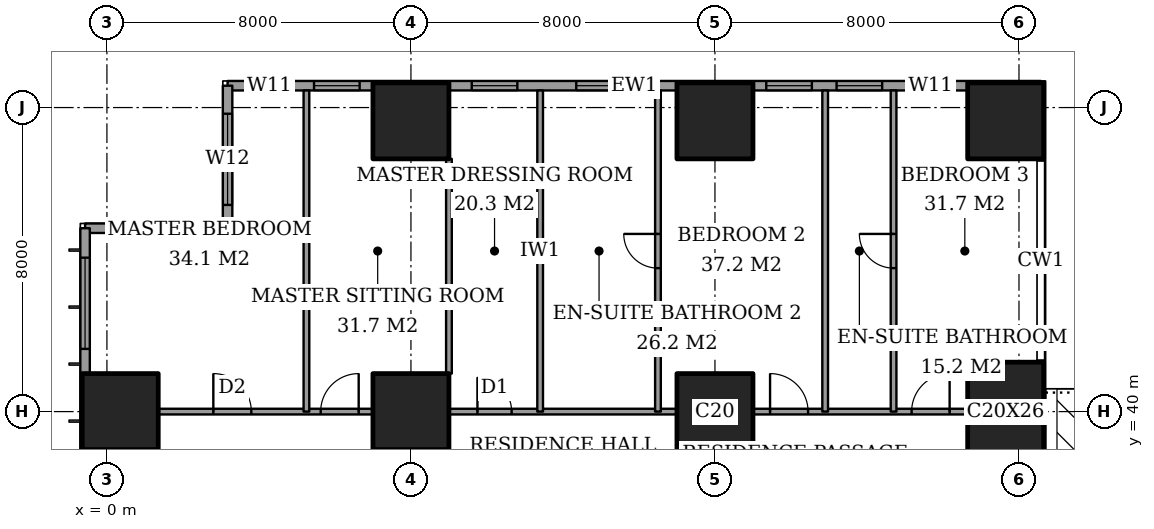
"""IFC4 building model, lengths in metres.
Left out: names, types, materials, properties, quantities, classifications, styles, units other than length and angle.
Written with IfcOpenShell. Run it as: python <this file> out.ifc"""

import sys

from ifc_helpers import new_model, si_unit, direction, frame, frame_2d, origin, origin_2d, place, context, subcontext, project, spatial, rectangle, extrude, element, fill, save


model = new_model("IFC4")
c1 = context("Model", 3, precision=1e-05, world=origin(), true_north=direction((0.0, 1.0)))
c2 = subcontext(c1, "Body", "Model", "MODEL_VIEW")
j1 = project(units=[si_unit("LENGTHUNIT", "METRE"), si_unit("PLANEANGLEUNIT", "RADIAN")], contexts=[c1])
p1 = place(None, origin())
s1 = spatial("IfcSite", under=j1, at=p1, CompositionType="ELEMENT")
p2 = place(p1, origin())
s2 = spatial("IfcBuilding", under=s1, at=p2, CompositionType="ELEMENT")
p3 = place(p2, frame((0.0, 0.0, 96.2)))
s3 = spatial("IfcBuildingStorey", under=s2, at=p3, CompositionType="ELEMENT", Elevation=96.2)
for number, where, z_axis, x_axis in (
    (1, (0.35, 40.0, 0.0), (0.0, 0.0, 1.0), (1.0, 0.0, 0.0)),
    (2, (8.0, 40.0, 0.0), (0.0, 0.0, 1.0), (1.0, 0.0, 0.0)),
    (3, (8.0, 47.65, 0.0), (0.0, 0.0, 1.0), (1.0, 0.0, 0.0)),
    (4, (16.0, 40.0, 0.0), (0.0, 0.0, 1.0), (1.0, 0.0, 0.0)),
    (5, (16.0, 47.65, 0.0), (0.0, 0.0, 1.0), (1.0, 0.0, 0.0)),
):
    element("IfcColumn", number, at=place(p3, frame(where, z_axis=z_axis, x_axis=x_axis)), inside=s3, PredefinedType="COLUMN", context=c2, shape_type="SweptSolid", body=[
        extrude(rectangle(XDim=2.0, YDim=2.0, at=origin_2d()), origin(), (0.0, 0.0, 1.0), 3.6),
    ])
p4 = place(p3, frame((23.65, 40.0, 0.0), z_axis=(0.0, 0.0, 1.0), x_axis=(1.0, 0.0, 0.0)))
e6 = element("IfcColumn", 6, at=p4, inside=s3, PredefinedType="COLUMN", context=c2, shape_type="SweptSolid", body=[
    extrude(rectangle(XDim=2.0, YDim=2.6, at=origin_2d()), origin(), (0.0, 0.0, 1.0), 3.6),
])
p5 = place(p3, frame((23.65, 47.65, 0.0), z_axis=(0.0, 0.0, 1.0), x_axis=(1.0, 0.0, 0.0)))
e7 = element("IfcColumn", 7, at=p5, inside=s3, PredefinedType="COLUMN", context=c2, shape_type="SweptSolid", body=[
    extrude(rectangle(XDim=2.0, YDim=2.0, at=origin_2d()), origin(), (0.0, 0.0, 1.0), 3.6),
])
p6 = place(p3, frame((24.575, 48.575, 0.0), z_axis=(0.0, 0.0, 1.0), x_axis=(-1.0, 0.0, 0.0)))
e8 = element("IfcWall", 8, at=p6, inside=s3, PredefinedType="SOLIDWALL", context=c2, shape_type="SweptSolid", body=[
    extrude(rectangle(XDim=21.4, YDim=0.25, at=frame_2d((10.7, 0.0))), origin(), (0.0, 0.0, 1.0), 3.6),
])
p7 = place(p6, frame((2.3, 0.0, 0.4)))
e9 = element("IfcOpeningElement", 9, at=p7, cuts=e8, PredefinedType="OPENING", context=c2, shape_type="SweptSolid", body=[
    extrude(rectangle(XDim=1.2, YDim=2.2, at=frame_2d((0.6, 1.1))), frame((0.0, 0.135, 0.0), z_axis=(0.0, -1.0, 0.0), x_axis=(1.0, 0.0, 0.0)), (0.0, 0.0, 1.0), 0.27),
])
p8 = place(p6, frame((4.175, 0.0, 0.4)))
e10 = element("IfcOpeningElement", 10, at=p8, cuts=e8, PredefinedType="OPENING", context=c2, shape_type="SweptSolid", body=[
    extrude(rectangle(XDim=1.2, YDim=2.2, at=frame_2d((0.6, 1.1))), frame((0.0, 0.135, 0.0), z_axis=(0.0, -1.0, 0.0), x_axis=(1.0, 0.0, 0.0)), (0.0, 0.0, 1.0), 0.27),
])
p9 = place(p6, frame((6.025, 0.0, 0.4)))
e11 = element("IfcOpeningElement", 11, at=p9, cuts=e8, PredefinedType="OPENING", context=c2, shape_type="SweptSolid", body=[
    extrude(rectangle(XDim=1.2, YDim=2.2, at=frame_2d((0.6, 1.1))), frame((0.0, 0.135, 0.0), z_axis=(0.0, -1.0, 0.0), x_axis=(1.0, 0.0, 0.0)), (0.0, 0.0, 1.0), 0.27),
])
p10 = place(p6, frame((11.025, 0.0, 0.4)))
e12 = element("IfcOpeningElement", 12, at=p10, cuts=e8, PredefinedType="OPENING", context=c2, shape_type="SweptSolid", body=[
    extrude(rectangle(XDim=1.2, YDim=2.2, at=frame_2d((0.6, 1.1))), frame((0.0, 0.135, 0.0), z_axis=(0.0, -1.0, 0.0), x_axis=(1.0, 0.0, 0.0)), (0.0, 0.0, 1.0), 0.27),
])
p11 = place(p6, frame((13.775, 0.0, 0.4)))
e13 = element("IfcOpeningElement", 13, at=p11, cuts=e8, PredefinedType="OPENING", context=c2, shape_type="SweptSolid", body=[
    extrude(rectangle(XDim=1.2, YDim=2.2, at=frame_2d((0.6, 1.1))), frame((0.0, 0.135, 0.0), z_axis=(0.0, -1.0, 0.0), x_axis=(1.0, 0.0, 0.0)), (0.0, 0.0, 1.0), 0.27),
])
p12 = place(p6, frame((17.925, 0.0, 0.4)))
e14 = element("IfcOpeningElement", 14, at=p12, cuts=e8, PredefinedType="OPENING", context=c2, shape_type="SweptSolid", body=[
    extrude(rectangle(XDim=1.2, YDim=2.2, at=frame_2d((0.6, 1.1))), frame((0.0, 0.135, 0.0), z_axis=(0.0, -1.0, 0.0), x_axis=(1.0, 0.0, 0.0)), (0.0, 0.0, 1.0), 0.27),
])
p13 = place(p6, frame((19.7, 0.0, 0.4)))
e15 = element("IfcOpeningElement", 15, at=p13, cuts=e8, PredefinedType="OPENING", context=c2, shape_type="SweptSolid", body=[
    extrude(rectangle(XDim=1.2, YDim=2.2, at=frame_2d((0.6, 1.1))), frame((0.0, 0.135, 0.0), z_axis=(0.0, -1.0, 0.0), x_axis=(1.0, 0.0, 0.0)), (0.0, 0.0, 1.0), 0.27),
])
p14 = place(p3, frame((3.175, 48.575, 0.0), z_axis=(0.0, 0.0, 1.0), x_axis=(0.0, -1.0, 0.0)))
e16 = element("IfcWall", 16, at=p14, inside=s3, PredefinedType="SOLIDWALL", context=c2, shape_type="SweptSolid", body=[
    extrude(rectangle(XDim=3.75, YDim=0.25, at=frame_2d((1.875, 0.0))), origin(), (0.0, 0.0, 1.0), 3.6),
])
p15 = place(p14, frame((0.738, 0.0, 0.4)))
e17 = element("IfcOpeningElement", 17, at=p15, cuts=e16, PredefinedType="OPENING", context=c2, shape_type="SweptSolid", body=[
    extrude(rectangle(XDim=2.4, YDim=2.2, at=frame_2d((1.2, 1.1))), frame((0.0, 0.135, 0.0), z_axis=(0.0, -1.0, 0.0), x_axis=(1.0, 0.0, 0.0)), (0.0, 0.0, 1.0), 0.27),
])
p16 = place(p3, frame((3.175, 44.825, 0.0), z_axis=(0.0, 0.0, 1.0), x_axis=(-1.0, 0.0, 0.0)))
e18 = element("IfcWall", 18, at=p16, inside=s3, PredefinedType="SOLIDWALL", context=c2, shape_type="SweptSolid", body=[
    extrude(rectangle(XDim=3.75, YDim=0.25, at=frame_2d((1.875, 0.0))), origin(), (0.0, 0.0, 1.0), 3.6),
])
p17 = place(p16, frame((0.613, 0.0, 0.4)))
e19 = element("IfcOpeningElement", 19, at=p17, cuts=e18, PredefinedType="OPENING", context=c2, shape_type="SweptSolid", body=[
    extrude(rectangle(XDim=2.4, YDim=2.2, at=frame_2d((1.2, 1.1))), frame((0.0, 0.135, 0.0), z_axis=(0.0, -1.0, 0.0), x_axis=(1.0, 0.0, 0.0)), (0.0, 0.0, 1.0), 0.27),
])
p18 = place(p3, frame((-0.575, 44.825, 0.0), z_axis=(0.0, 0.0, 1.0), x_axis=(0.0, -1.0, 0.0)))
e20 = element("IfcWall", 20, at=p18, inside=s3, PredefinedType="SOLIDWALL", context=c2, shape_type="SweptSolid", body=[
    extrude(rectangle(XDim=41.65, YDim=0.25, at=frame_2d((20.825, 0.0))), origin(), (0.0, 0.0, 1.0), 3.6),
])
p19 = place(p18, frame((0.775, 0.0, 0.4)))
e21 = element("IfcOpeningElement", 21, at=p19, cuts=e20, PredefinedType="OPENING", context=c2, shape_type="SweptSolid", body=[
    extrude(rectangle(XDim=2.4, YDim=2.2, at=frame_2d((1.2, 1.1))), frame((0.0, 0.135, 0.0), z_axis=(0.0, -1.0, 0.0), x_axis=(1.0, 0.0, 0.0)), (0.0, 0.0, 1.0), 0.27),
])
p20 = place(p18, frame((6.1, 0.0, 0.4)))
e22 = element("IfcOpeningElement", 22, at=p20, cuts=e20, PredefinedType="OPENING", context=c2, shape_type="SweptSolid", body=[
    extrude(rectangle(XDim=1.2, YDim=2.2, at=frame_2d((0.6, 1.1))), frame((0.0, 0.135, 0.0), z_axis=(0.0, -1.0, 0.0), x_axis=(1.0, 0.0, 0.0)), (0.0, 0.0, 1.0), 0.27),
])
p21 = place(p18, frame((8.425, 0.0, 0.4)))
e23 = element("IfcOpeningElement", 23, at=p21, cuts=e20, PredefinedType="OPENING", context=c2, shape_type="SweptSolid", body=[
    extrude(rectangle(XDim=2.4, YDim=2.2, at=frame_2d((1.2, 1.1))), frame((0.0, 0.135, 0.0), z_axis=(0.0, -1.0, 0.0), x_axis=(1.0, 0.0, 0.0)), (0.0, 0.0, 1.0), 0.27),
])
p22 = place(p18, frame((15.625, 0.0, 0.4)))
e24 = element("IfcOpeningElement", 24, at=p22, cuts=e20, PredefinedType="OPENING", context=c2, shape_type="SweptSolid", body=[
    extrude(rectangle(XDim=2.4, YDim=2.2, at=frame_2d((1.2, 1.1))), frame((0.0, 0.135, 0.0), z_axis=(0.0, -1.0, 0.0), x_axis=(1.0, 0.0, 0.0)), (0.0, 0.0, 1.0), 0.27),
])
p23 = place(p18, frame((23.625, 0.0, 0.4)))
e25 = element("IfcOpeningElement", 25, at=p23, cuts=e20, PredefinedType="OPENING", context=c2, shape_type="SweptSolid", body=[
    extrude(rectangle(XDim=2.4, YDim=2.2, at=frame_2d((1.2, 1.1))), frame((0.0, 0.135, 0.0), z_axis=(0.0, -1.0, 0.0), x_axis=(1.0, 0.0, 0.0)), (0.0, 0.0, 1.0), 0.27),
])
p24 = place(p18, frame((30.725, 0.0, 0.4)))
e26 = element("IfcOpeningElement", 26, at=p24, cuts=e20, PredefinedType="OPENING", context=c2, shape_type="SweptSolid", body=[
    extrude(rectangle(XDim=2.4, YDim=2.2, at=frame_2d((1.2, 1.1))), frame((0.0, 0.135, 0.0), z_axis=(0.0, -1.0, 0.0), x_axis=(1.0, 0.0, 0.0)), (0.0, 0.0, 1.0), 0.27),
])
p25 = place(p18, frame((34.325, 0.0, 0.4)))
e27 = element("IfcOpeningElement", 27, at=p25, cuts=e20, PredefinedType="OPENING", context=c2, shape_type="SweptSolid", body=[
    extrude(rectangle(XDim=1.2, YDim=2.2, at=frame_2d((0.6, 1.1))), frame((0.0, 0.135, 0.0), z_axis=(0.0, -1.0, 0.0), x_axis=(1.0, 0.0, 0.0)), (0.0, 0.0, 1.0), 0.27),
])
p26 = place(p18, frame((38.475, 0.0, 0.4)))
e28 = element("IfcOpeningElement", 28, at=p26, cuts=e20, PredefinedType="OPENING", context=c2, shape_type="SweptSolid", body=[
    extrude(rectangle(XDim=2.4, YDim=2.2, at=frame_2d((1.2, 1.1))), frame((0.0, 0.135, 0.0), z_axis=(0.0, -1.0, 0.0), x_axis=(1.0, 0.0, 0.0)), (0.0, 0.0, 1.0), 0.27),
])
p27 = place(p3, frame((1.35, 40.0, 0.0), z_axis=(0.0, 0.0, 1.0), x_axis=(1.0, 0.0, 0.0)))
e29 = element("IfcWall", 29, at=p27, inside=s3, PredefinedType="PARTITIONING", context=c2, shape_type="SweptSolid", body=[
    extrude(rectangle(XDim=5.65, YDim=0.15, at=frame_2d((2.825, 0.0))), origin(), (0.0, 0.0, 1.0), 3.35),
])
p28 = place(p27, frame((1.45, 0.0, 0.0)))
e30 = element("IfcOpeningElement", 30, at=p28, cuts=e29, PredefinedType="OPENING", context=c2, shape_type="SweptSolid", body=[
    extrude(rectangle(XDim=1.0, YDim=2.1, at=frame_2d((0.5, 1.05))), frame((0.0, 0.085, 0.0), z_axis=(0.0, -1.0, 0.0), x_axis=(1.0, 0.0, 0.0)), (0.0, 0.0, 1.0), 0.17),
])
p29 = place(p27, frame((4.275, 0.0, 0.0)))
e31 = element("IfcOpeningElement", 31, at=p29, cuts=e29, PredefinedType="OPENING", context=c2, shape_type="SweptSolid", body=[
    extrude(rectangle(XDim=1.0, YDim=2.1, at=frame_2d((0.5, 1.05))), frame((0.0, 0.085, 0.0), z_axis=(0.0, -1.0, 0.0), x_axis=(1.0, 0.0, 0.0)), (0.0, 0.0, 1.0), 0.17),
])
p30 = place(p3, frame((9.0, 40.0, 0.0), z_axis=(0.0, 0.0, 1.0), x_axis=(1.0, 0.0, 0.0)))
e32 = element("IfcWall", 32, at=p30, inside=s3, PredefinedType="PARTITIONING", context=c2, shape_type="SweptSolid", body=[
    extrude(rectangle(XDim=6.0, YDim=0.15, at=frame_2d((3.0, 0.0))), origin(), (0.0, 0.0, 1.0), 3.35),
])
p31 = place(p30, frame((0.75, 0.0, 0.0)))
e33 = element("IfcOpeningElement", 33, at=p31, cuts=e32, PredefinedType="OPENING", context=c2, shape_type="SweptSolid", body=[
    extrude(rectangle(XDim=0.9, YDim=2.1, at=frame_2d((0.45, 1.05))), frame((0.0, 0.085, 0.0), z_axis=(0.0, -1.0, 0.0), x_axis=(1.0, 0.0, 0.0)), (0.0, 0.0, 1.0), 0.17),
])
p32 = place(p3, frame((17.0, 40.0, 0.0), z_axis=(0.0, 0.0, 1.0), x_axis=(1.0, 0.0, 0.0)))
e34 = element("IfcWall", 34, at=p32, inside=s3, PredefinedType="PARTITIONING", context=c2, shape_type="SweptSolid", body=[
    extrude(rectangle(XDim=5.65, YDim=0.15, at=frame_2d((2.825, 0.0))), origin(), (0.0, 0.0, 1.0), 3.35),
])
p33 = place(p32, frame((0.45, 0.0, 0.0)))
e35 = element("IfcOpeningElement", 35, at=p33, cuts=e34, PredefinedType="OPENING", context=c2, shape_type="SweptSolid", body=[
    extrude(rectangle(XDim=1.0, YDim=2.1, at=frame_2d((0.5, 1.05))), frame((0.0, 0.085, 0.0), z_axis=(0.0, -1.0, 0.0), x_axis=(1.0, 0.0, 0.0)), (0.0, 0.0, 1.0), 0.17),
])
p34 = place(p32, frame((4.175, 0.0, 0.0)))
e36 = element("IfcOpeningElement", 36, at=p34, cuts=e34, PredefinedType="OPENING", context=c2, shape_type="SweptSolid", body=[
    extrude(rectangle(XDim=1.0, YDim=2.1, at=frame_2d((0.5, 1.05))), frame((0.0, 0.085, 0.0), z_axis=(0.0, -1.0, 0.0), x_axis=(1.0, 0.0, 0.0)), (0.0, 0.0, 1.0), 0.17),
])
p35 = place(p3, frame((5.25, 40.0, 0.0), z_axis=(0.0, 0.0, 1.0), x_axis=(0.0, 1.0, 0.0)))
e37 = element("IfcWall", 37, at=p35, inside=s3, PredefinedType="PARTITIONING", context=c2, shape_type="SweptSolid", body=[
    extrude(rectangle(XDim=8.45, YDim=0.15, at=frame_2d((4.225, 0.0))), origin(), (0.0, 0.0, 1.0), 3.35),
])
p36 = place(p3, frame((9.0, 41.0, 0.0), z_axis=(0.0, 0.0, 1.0), x_axis=(0.0, 1.0, 0.0)))
e38 = element("IfcWall", 38, at=p36, inside=s3, PredefinedType="PARTITIONING", context=c2, shape_type="SweptSolid", body=[
    extrude(rectangle(XDim=5.65, YDim=0.15, at=frame_2d((2.825, 0.0))), origin(), (0.0, 0.0, 1.0), 3.35),
])
p37 = place(p3, frame((11.4, 40.0, 0.0), z_axis=(0.0, 0.0, 1.0), x_axis=(0.0, 1.0, 0.0)))
e39 = element("IfcWall", 39, at=p37, inside=s3, PredefinedType="PARTITIONING", context=c2, shape_type="SweptSolid", body=[
    extrude(rectangle(XDim=8.45, YDim=0.15, at=frame_2d((4.225, 0.0))), origin(), (0.0, 0.0, 1.0), 3.35),
])
p38 = place(p3, frame((14.5, 40.0, 0.0), z_axis=(0.0, 0.0, 1.0), x_axis=(0.0, 1.0, 0.0)))
e40 = element("IfcWall", 40, at=p38, inside=s3, PredefinedType="PARTITIONING", context=c2, shape_type="SweptSolid", body=[
    extrude(rectangle(XDim=8.45, YDim=0.15, at=frame_2d((4.225, 0.0))), origin(), (0.0, 0.0, 1.0), 3.35),
])
p39 = place(p38, frame((3.775, 0.0, 0.0)))
e41 = element("IfcOpeningElement", 41, at=p39, cuts=e40, PredefinedType="OPENING", context=c2, shape_type="SweptSolid", body=[
    extrude(rectangle(XDim=0.9, YDim=2.1, at=frame_2d((0.45, 1.05))), frame((0.0, 0.085, 0.0), z_axis=(0.0, -1.0, 0.0), x_axis=(1.0, 0.0, 0.0)), (0.0, 0.0, 1.0), 0.17),
])
p40 = place(p3, frame((18.9, 40.0, 0.0), z_axis=(0.0, 0.0, 1.0), x_axis=(0.0, 1.0, 0.0)))
e42 = element("IfcWall", 42, at=p40, inside=s3, PredefinedType="PARTITIONING", context=c2, shape_type="SweptSolid", body=[
    extrude(rectangle(XDim=8.45, YDim=0.15, at=frame_2d((4.225, 0.0))), origin(), (0.0, 0.0, 1.0), 3.35),
])
p41 = place(p3, frame((20.7, 40.0, 0.0), z_axis=(0.0, 0.0, 1.0), x_axis=(0.0, 1.0, 0.0)))
e43 = element("IfcWall", 43, at=p41, inside=s3, PredefinedType="PARTITIONING", context=c2, shape_type="SweptSolid", body=[
    extrude(rectangle(XDim=8.45, YDim=0.15, at=frame_2d((4.225, 0.0))), origin(), (0.0, 0.0, 1.0), 3.35),
])
p42 = place(p41, frame((3.775, 0.0, 0.0)))
e44 = element("IfcOpeningElement", 44, at=p42, cuts=e43, PredefinedType="OPENING", context=c2, shape_type="SweptSolid", body=[
    extrude(rectangle(XDim=0.9, YDim=2.1, at=frame_2d((0.45, 1.05))), frame((0.0, 0.085, 0.0), z_axis=(0.0, -1.0, 0.0), x_axis=(1.0, 0.0, 0.0)), (0.0, 0.0, 1.0), 0.17),
])
p43 = place(p7, origin())
e45 = element("IfcWindow", 45, at=p43, inside=s3, PartitioningType="SINGLE_PANEL", PredefinedType="WINDOW", context=c2, shape_type="SweptSolid", body=[
    extrude(rectangle(XDim=1.2, YDim=2.2, at=frame_2d((0.6, 1.1))), frame((0.0, 0.03, 0.0), z_axis=(0.0, -1.0, 0.0), x_axis=(1.0, 0.0, 0.0)), (0.0, 0.0, 1.0), 0.06),
])
fill(e9, e45)
p44 = place(p8, origin())
e46 = element("IfcWindow", 46, at=p44, inside=s3, PartitioningType="SINGLE_PANEL", PredefinedType="WINDOW", context=c2, shape_type="SweptSolid", body=[
    extrude(rectangle(XDim=1.2, YDim=2.2, at=frame_2d((0.6, 1.1))), frame((0.0, 0.03, 0.0), z_axis=(0.0, -1.0, 0.0), x_axis=(1.0, 0.0, 0.0)), (0.0, 0.0, 1.0), 0.06),
])
fill(e10, e46)
p45 = place(p9, origin())
e47 = element("IfcWindow", 47, at=p45, inside=s3, PartitioningType="SINGLE_PANEL", PredefinedType="WINDOW", context=c2, shape_type="SweptSolid", body=[
    extrude(rectangle(XDim=1.2, YDim=2.2, at=frame_2d((0.6, 1.1))), frame((0.0, 0.03, 0.0), z_axis=(0.0, -1.0, 0.0), x_axis=(1.0, 0.0, 0.0)), (0.0, 0.0, 1.0), 0.06),
])
fill(e11, e47)
p46 = place(p10, origin())
e48 = element("IfcWindow", 48, at=p46, inside=s3, PartitioningType="SINGLE_PANEL", PredefinedType="WINDOW", context=c2, shape_type="SweptSolid", body=[
    extrude(rectangle(XDim=1.2, YDim=2.2, at=frame_2d((0.6, 1.1))), frame((0.0, 0.03, 0.0), z_axis=(0.0, -1.0, 0.0), x_axis=(1.0, 0.0, 0.0)), (0.0, 0.0, 1.0), 0.06),
])
fill(e12, e48)
p47 = place(p11, origin())
e49 = element("IfcWindow", 49, at=p47, inside=s3, PartitioningType="SINGLE_PANEL", PredefinedType="WINDOW", context=c2, shape_type="SweptSolid", body=[
    extrude(rectangle(XDim=1.2, YDim=2.2, at=frame_2d((0.6, 1.1))), frame((0.0, 0.03, 0.0), z_axis=(0.0, -1.0, 0.0), x_axis=(1.0, 0.0, 0.0)), (0.0, 0.0, 1.0), 0.06),
])
fill(e13, e49)
p48 = place(p12, origin())
e50 = element("IfcWindow", 50, at=p48, inside=s3, PartitioningType="SINGLE_PANEL", PredefinedType="WINDOW", context=c2, shape_type="SweptSolid", body=[
    extrude(rectangle(XDim=1.2, YDim=2.2, at=frame_2d((0.6, 1.1))), frame((0.0, 0.03, 0.0), z_axis=(0.0, -1.0, 0.0), x_axis=(1.0, 0.0, 0.0)), (0.0, 0.0, 1.0), 0.06),
])
fill(e14, e50)
p49 = place(p13, origin())
e51 = element("IfcWindow", 51, at=p49, inside=s3, PartitioningType="SINGLE_PANEL", PredefinedType="WINDOW", context=c2, shape_type="SweptSolid", body=[
    extrude(rectangle(XDim=1.2, YDim=2.2, at=frame_2d((0.6, 1.1))), frame((0.0, 0.03, 0.0), z_axis=(0.0, -1.0, 0.0), x_axis=(1.0, 0.0, 0.0)), (0.0, 0.0, 1.0), 0.06),
])
fill(e15, e51)
p50 = place(p15, origin())
e52 = element("IfcWindow", 52, at=p50, inside=s3, PartitioningType="SINGLE_PANEL", PredefinedType="WINDOW", context=c2, shape_type="SweptSolid", body=[
    extrude(rectangle(XDim=2.4, YDim=2.2, at=frame_2d((1.2, 1.1))), frame((0.0, 0.03, 0.0), z_axis=(0.0, -1.0, 0.0), x_axis=(1.0, 0.0, 0.0)), (0.0, 0.0, 1.0), 0.06),
])
fill(e17, e52)
p51 = place(p17, origin())
e53 = element("IfcWindow", 53, at=p51, inside=s3, PartitioningType="SINGLE_PANEL", PredefinedType="WINDOW", context=c2, shape_type="SweptSolid", body=[
    extrude(rectangle(XDim=2.4, YDim=2.2, at=frame_2d((1.2, 1.1))), frame((0.0, 0.03, 0.0), z_axis=(0.0, -1.0, 0.0), x_axis=(1.0, 0.0, 0.0)), (0.0, 0.0, 1.0), 0.06),
])
fill(e19, e53)
p52 = place(p19, origin())
e54 = element("IfcWindow", 54, at=p52, inside=s3, PartitioningType="SINGLE_PANEL", PredefinedType="WINDOW", context=c2, shape_type="SweptSolid", body=[
    extrude(rectangle(XDim=2.4, YDim=2.2, at=frame_2d((1.2, 1.1))), frame((0.0, 0.03, 0.0), z_axis=(0.0, -1.0, 0.0), x_axis=(1.0, 0.0, 0.0)), (0.0, 0.0, 1.0), 0.06),
])
fill(e21, e54)
p53 = place(p28, origin())
e55 = element("IfcDoor", 55, at=p53, inside=s3, OperationType="SINGLE_SWING_RIGHT", PredefinedType="DOOR", context=c2, shape_type="SweptSolid", body=[
    extrude(rectangle(XDim=1.0, YDim=2.1, at=frame_2d((0.5, 1.05))), frame((0.0, 0.025, 0.0), z_axis=(0.0, -1.0, 0.0), x_axis=(1.0, 0.0, 0.0)), (0.0, 0.0, 1.0), 0.05),
])
fill(e30, e55)
p54 = place(p29, origin())
e56 = element("IfcDoor", 56, at=p54, inside=s3, OperationType="SINGLE_SWING_LEFT", PredefinedType="DOOR", context=c2, shape_type="SweptSolid", body=[
    extrude(rectangle(XDim=1.0, YDim=2.1, at=frame_2d((0.5, 1.05))), frame((0.0, 0.025, 0.0), z_axis=(0.0, -1.0, 0.0), x_axis=(1.0, 0.0, 0.0)), (0.0, 0.0, 1.0), 0.05),
])
fill(e31, e56)
p55 = place(p31, origin())
e57 = element("IfcDoor", 57, at=p55, inside=s3, OperationType="SINGLE_SWING_RIGHT", PredefinedType="DOOR", context=c2, shape_type="SweptSolid", body=[
    extrude(rectangle(XDim=0.9, YDim=2.1, at=frame_2d((0.45, 1.05))), frame((0.0, 0.025, 0.0), z_axis=(0.0, -1.0, 0.0), x_axis=(1.0, 0.0, 0.0)), (0.0, 0.0, 1.0), 0.05),
])
fill(e33, e57)
p56 = place(p39, origin())
e58 = element("IfcDoor", 58, at=p56, inside=s3, OperationType="SINGLE_SWING_LEFT", PredefinedType="DOOR", context=c2, shape_type="SweptSolid", body=[
    extrude(rectangle(XDim=0.9, YDim=2.1, at=frame_2d((0.45, 1.05))), frame((0.0, 0.025, 0.0), z_axis=(0.0, -1.0, 0.0), x_axis=(1.0, 0.0, 0.0)), (0.0, 0.0, 1.0), 0.05),
])
fill(e41, e58)
p57 = place(p33, origin())
e59 = element("IfcDoor", 59, at=p57, inside=s3, OperationType="SINGLE_SWING_RIGHT", PredefinedType="DOOR", context=c2, shape_type="SweptSolid", body=[
    extrude(rectangle(XDim=1.0, YDim=2.1, at=frame_2d((0.5, 1.05))), frame((0.0, 0.025, 0.0), z_axis=(0.0, -1.0, 0.0), x_axis=(1.0, 0.0, 0.0)), (0.0, 0.0, 1.0), 0.05),
])
fill(e35, e59)
p58 = place(p42, origin())
e60 = element("IfcDoor", 60, at=p58, inside=s3, OperationType="SINGLE_SWING_LEFT", PredefinedType="DOOR", context=c2, shape_type="SweptSolid", body=[
    extrude(rectangle(XDim=0.9, YDim=2.1, at=frame_2d((0.45, 1.05))), frame((0.0, 0.025, 0.0), z_axis=(0.0, -1.0, 0.0), x_axis=(1.0, 0.0, 0.0)), (0.0, 0.0, 1.0), 0.05),
])
fill(e44, e60)
p59 = place(p34, origin())
e61 = element("IfcDoor", 61, at=p59, inside=s3, OperationType="SINGLE_SWING_LEFT", PredefinedType="DOOR", context=c2, shape_type="SweptSolid", body=[
    extrude(rectangle(XDim=1.0, YDim=2.1, at=frame_2d((0.5, 1.05))), frame((0.0, 0.025, 0.0), z_axis=(0.0, -1.0, 0.0), x_axis=(1.0, 0.0, 0.0)), (0.0, 0.0, 1.0), 0.05),
])
fill(e36, e61)
save(model, sys.argv[1])
